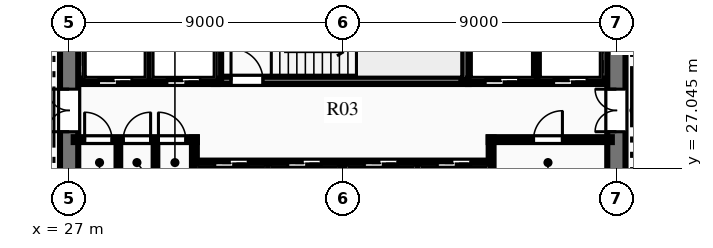
"""IFC4 building model, lengths in metres.
Left out: names, types, materials, properties, quantities, classifications, styles, units other than length and angle.
Written with IfcOpenShell. Run it as: python <this file> out.ifc"""

import sys

from ifc_helpers import new_model, si_unit, direction, frame, frame_2d, origin, place, context, subcontext, project, spatial, rectangle, extrude, element, fill, save


model = new_model("IFC4")
c1 = context("Model", 3, precision=1e-05, world=origin(), true_north=direction((0.0, 1.0)))
c2 = subcontext(c1, "Body", "Model", "MODEL_VIEW")
j1 = project(units=[si_unit("LENGTHUNIT", "METRE"), si_unit("PLANEANGLEUNIT", "RADIAN")], contexts=[c1])
p1 = place(None, origin())
s1 = spatial("IfcSite", under=j1, at=p1, CompositionType="ELEMENT")
p2 = place(p1, origin())
s2 = spatial("IfcBuilding", under=s1, at=p2, CompositionType="ELEMENT")
p3 = place(p2, frame((0.0, 0.0, 47.7)))
s3 = spatial("IfcBuildingStorey", under=s2, at=p3, CompositionType="ELEMENT", Elevation=47.7)
p4 = place(p3, frame((27.0, 18.3, 0.0), z_axis=(0.0, 0.0, 1.0), x_axis=(0.0, 1.0, 0.0)))
e1 = element("IfcWall", 1, at=p4, inside=s3, PredefinedType="SHEAR", context=c2, shape_type="SweptSolid", body=[
    extrude(rectangle(XDim=15.4, YDim=0.6, at=frame_2d((7.7, 0.0))), origin(), (0.0, 0.0, 1.0), 3.75),
])
p5 = place(p4, frame((9.94, 0.0, 0.0)))
e2 = element("IfcOpeningElement", 2, at=p5, cuts=e1, PredefinedType="OPENING", context=c2, shape_type="SweptSolid", body=[
    extrude(rectangle(XDim=1.4, YDim=2.2, at=frame_2d((0.7, 1.1))), frame((0.0, 0.31, 0.0), z_axis=(0.0, -1.0, 0.0), x_axis=(1.0, 0.0, 0.0)), (0.0, 0.0, 1.0), 0.62),
])
p6 = place(p3, frame((45.0, 18.3, 0.0), z_axis=(0.0, 0.0, 1.0), x_axis=(0.0, 1.0, 0.0)))
e3 = element("IfcWall", 3, at=p6, inside=s3, PredefinedType="SHEAR", context=c2, shape_type="SweptSolid", body=[
    extrude(rectangle(XDim=15.4, YDim=0.6, at=frame_2d((7.7, 0.0))), origin(), (0.0, 0.0, 1.0), 3.75),
])
p7 = place(p6, frame((9.94, 0.0, 0.0)))
e4 = element("IfcOpeningElement", 4, at=p7, cuts=e3, PredefinedType="OPENING", context=c2, shape_type="SweptSolid", body=[
    extrude(rectangle(XDim=1.4, YDim=2.2, at=frame_2d((0.7, 1.1))), frame((0.0, 0.31, 0.0), z_axis=(0.0, -1.0, 0.0), x_axis=(1.0, 0.0, 0.0)), (0.0, 0.0, 1.0), 0.62),
])
p8 = place(p3, frame((31.76, 29.93, 0.0), z_axis=(0.0, 0.0, 1.0), x_axis=(1.0, 0.0, 0.0)))
e5 = element("IfcWall", 5, at=p8, inside=s3, PredefinedType="SHEAR", context=c2, shape_type="SweptSolid", body=[
    extrude(rectangle(XDim=8.38, YDim=0.24, at=frame_2d((4.19, 0.0))), origin(), (0.0, 0.0, 1.0), 3.75),
])
p9 = place(p8, frame((0.565, 0.0, 0.0)))
e6 = element("IfcOpeningElement", 6, at=p9, cuts=e5, PredefinedType="OPENING", context=c2, shape_type="SweptSolid", body=[
    extrude(rectangle(XDim=1.05, YDim=2.15, at=frame_2d((0.525, 1.075))), frame((0.0, 0.13, 0.0), z_axis=(0.0, -1.0, 0.0), x_axis=(1.0, 0.0, 0.0)), (0.0, 0.0, 1.0), 0.26),
])
p10 = place(p3, frame((31.88, 29.93, 0.0), z_axis=(0.0, 0.0, 1.0), x_axis=(0.0, 1.0, 0.0)))
e7 = element("IfcWall", 7, at=p10, inside=s3, PredefinedType="SHEAR", context=c2, shape_type="SweptSolid", body=[
    extrude(rectangle(XDim=3.79, YDim=0.24, at=frame_2d((1.895, 0.0))), origin(), (0.0, 0.0, 1.0), 3.75),
])
p11 = place(p3, frame((40.02, 29.93, 0.0), z_axis=(0.0, 0.0, 1.0), x_axis=(0.0, 1.0, 0.0)))
e8 = element("IfcWall", 8, at=p11, inside=s3, PredefinedType="SHEAR", context=c2, shape_type="SweptSolid", body=[
    extrude(rectangle(XDim=3.85, YDim=0.24, at=frame_2d((1.925, 0.0))), origin(), (0.0, 0.0, 1.0), 3.75),
])
p12 = place(p3, frame((27.15, 27.98, 0.0), z_axis=(0.0, 0.0, 1.0), x_axis=(1.0, 0.0, 0.0)))
e9 = element("IfcWall", 9, at=p12, inside=s3, PredefinedType="PARTITIONING", context=c2, shape_type="SweptSolid", body=[
    extrude(rectangle(XDim=4.05, YDim=0.16, at=frame_2d((2.025, 0.0))), origin(), (0.0, 0.0, 1.0), 3.44),
])
p13 = place(p12, frame((0.36, 0.0, 0.0)))
e10 = element("IfcOpeningElement", 10, at=p13, cuts=e9, PredefinedType="OPENING", context=c2, shape_type="SweptSolid", body=[
    extrude(rectangle(XDim=0.9, YDim=2.15, at=frame_2d((0.45, 1.075))), frame((0.0, 0.09, 0.0), z_axis=(0.0, -1.0, 0.0), x_axis=(1.0, 0.0, 0.0)), (0.0, 0.0, 1.0), 0.18),
])
p14 = place(p12, frame((1.63, 0.0, 0.0)))
e11 = element("IfcOpeningElement", 11, at=p14, cuts=e9, PredefinedType="OPENING", context=c2, shape_type="SweptSolid", body=[
    extrude(rectangle(XDim=0.9, YDim=2.15, at=frame_2d((0.45, 1.075))), frame((0.0, 0.09, 0.0), z_axis=(0.0, -1.0, 0.0), x_axis=(1.0, 0.0, 0.0)), (0.0, 0.0, 1.0), 0.18),
])
p15 = place(p12, frame((2.788, 0.0, 0.0)))
e12 = element("IfcOpeningElement", 12, at=p15, cuts=e9, PredefinedType="OPENING", context=c2, shape_type="SweptSolid", body=[
    extrude(rectangle(XDim=0.9, YDim=2.15, at=frame_2d((0.45, 1.075))), frame((0.0, 0.09, 0.0), z_axis=(0.0, -1.0, 0.0), x_axis=(1.0, 0.0, 0.0)), (0.0, 0.0, 1.0), 0.18),
])
p16 = place(p3, frame((31.12, 26.54, 0.0), z_axis=(0.0, 0.0, 1.0), x_axis=(0.0, 1.0, 0.0)))
e13 = element("IfcWall", 13, at=p16, inside=s3, PredefinedType="PARTITIONING", context=c2, shape_type="SweptSolid", body=[
    extrude(rectangle(XDim=1.51, YDim=0.16, at=frame_2d((0.755, 0.0))), origin(), (0.0, 0.0, 1.0), 3.44),
])
p17 = place(p3, frame((40.8, 27.98, 0.0), z_axis=(0.0, 0.0, 1.0), x_axis=(1.0, 0.0, 0.0)))
e14 = element("IfcWall", 14, at=p17, inside=s3, PredefinedType="PARTITIONING", context=c2, shape_type="SweptSolid", body=[
    extrude(rectangle(XDim=4.05, YDim=0.16, at=frame_2d((2.025, 0.0))), origin(), (0.0, 0.0, 1.0), 3.44),
])
p18 = place(p17, frame((1.475, 0.0, 0.0)))
e15 = element("IfcOpeningElement", 15, at=p18, cuts=e14, PredefinedType="OPENING", context=c2, shape_type="SweptSolid", body=[
    extrude(rectangle(XDim=0.95, YDim=2.15, at=frame_2d((0.475, 1.075))), frame((0.0, 0.09, 0.0), z_axis=(0.0, -1.0, 0.0), x_axis=(1.0, 0.0, 0.0)), (0.0, 0.0, 1.0), 0.18),
])
p19 = place(p3, frame((40.88, 26.54, 0.0), z_axis=(0.0, 0.0, 1.0), x_axis=(0.0, 1.0, 0.0)))
e16 = element("IfcWall", 16, at=p19, inside=s3, PredefinedType="PARTITIONING", context=c2, shape_type="SweptSolid", body=[
    extrude(rectangle(XDim=1.51, YDim=0.16, at=frame_2d((0.755, 0.0))), origin(), (0.0, 0.0, 1.0), 3.44),
])
for number, where, z_axis, x_axis in (
    (17, (28.62, 26.54, 0.0), (0.0, 0.0, 1.0), (0.0, 1.0, 0.0)),
    (18, (29.84, 26.54, 0.0), (0.0, 0.0, 1.0), (0.0, 1.0, 0.0)),
):
    element("IfcWall", number, at=place(p3, frame(where, z_axis=z_axis, x_axis=x_axis)), inside=s3, PredefinedType="PARTITIONING", context=c2, shape_type="SweptSolid", body=[
        extrude(rectangle(XDim=1.44, YDim=0.12, at=frame_2d((0.72, 0.0))), origin(), (0.0, 0.0, 1.0), 3.44),
    ])
p20 = place(p3, frame((27.45, 29.9, 0.0), z_axis=(0.0, 0.0, 1.0), x_axis=(1.0, 0.0, 0.0)))
e19 = element("IfcWall", 19, at=p20, inside=s3, PredefinedType="PARTITIONING", context=c2, shape_type="SweptSolid", body=[
    extrude(rectangle(XDim=4.43, YDim=0.18, at=frame_2d((2.215, 0.0))), origin(), (0.0, 0.0, 1.0), 3.44),
])
p21 = place(p20, frame((0.515, 0.0, 0.0)))
e20 = element("IfcOpeningElement", 20, at=p21, cuts=e19, PredefinedType="OPENING", context=c2, shape_type="SweptSolid", body=[
    extrude(rectangle(XDim=1.1, YDim=2.15, at=frame_2d((0.55, 1.075))), frame((0.0, 0.1, 0.0), z_axis=(0.0, -1.0, 0.0), x_axis=(1.0, 0.0, 0.0)), (0.0, 0.0, 1.0), 0.2),
])
p22 = place(p20, frame((2.765, 0.0, 0.0)))
e21 = element("IfcOpeningElement", 21, at=p22, cuts=e19, PredefinedType="OPENING", context=c2, shape_type="SweptSolid", body=[
    extrude(rectangle(XDim=1.1, YDim=2.15, at=frame_2d((0.55, 1.075))), frame((0.0, 0.1, 0.0), z_axis=(0.0, -1.0, 0.0), x_axis=(1.0, 0.0, 0.0)), (0.0, 0.0, 1.0), 0.2),
])
p23 = place(p3, frame((29.63, 29.9, 0.0), z_axis=(0.0, 0.0, 1.0), x_axis=(0.0, 1.0, 0.0)))
e22 = element("IfcWall", 22, at=p23, inside=s3, PredefinedType="PARTITIONING", context=c2, shape_type="SweptSolid", body=[
    extrude(rectangle(XDim=3.75, YDim=0.18, at=frame_2d((1.875, 0.0))), origin(), (0.0, 0.0, 1.0), 3.44),
])
p24 = place(p3, frame((40.12, 29.9, 0.0), z_axis=(0.0, 0.0, 1.0), x_axis=(1.0, 0.0, 0.0)))
e23 = element("IfcWall", 23, at=p24, inside=s3, PredefinedType="PARTITIONING", context=c2, shape_type="SweptSolid", body=[
    extrude(rectangle(XDim=4.43, YDim=0.18, at=frame_2d((2.215, 0.0))), origin(), (0.0, 0.0, 1.0), 3.44),
])
p25 = place(p24, frame((0.565, 0.0, 0.0)))
e24 = element("IfcOpeningElement", 24, at=p25, cuts=e23, PredefinedType="OPENING", context=c2, shape_type="SweptSolid", body=[
    extrude(rectangle(XDim=1.1, YDim=2.15, at=frame_2d((0.55, 1.075))), frame((0.0, 0.1, 0.0), z_axis=(0.0, -1.0, 0.0), x_axis=(1.0, 0.0, 0.0)), (0.0, 0.0, 1.0), 0.2),
])
p26 = place(p24, frame((2.815, 0.0, 0.0)))
e25 = element("IfcOpeningElement", 25, at=p26, cuts=e23, PredefinedType="OPENING", context=c2, shape_type="SweptSolid", body=[
    extrude(rectangle(XDim=1.1, YDim=2.15, at=frame_2d((0.55, 1.075))), frame((0.0, 0.1, 0.0), z_axis=(0.0, -1.0, 0.0), x_axis=(1.0, 0.0, 0.0)), (0.0, 0.0, 1.0), 0.2),
])
p27 = place(p3, frame((42.37, 29.9, 0.0), z_axis=(0.0, 0.0, 1.0), x_axis=(0.0, 1.0, 0.0)))
e26 = element("IfcWall", 26, at=p27, inside=s3, PredefinedType="PARTITIONING", context=c2, shape_type="SweptSolid", body=[
    extrude(rectangle(XDim=3.75, YDim=0.18, at=frame_2d((1.875, 0.0))), origin(), (0.0, 0.0, 1.0), 3.44),
])
p28 = place(p3, frame((31.2, 27.2, 0.0), z_axis=(0.0, 0.0, 1.0), x_axis=(1.0, 0.0, 0.0)))
e27 = element("IfcWall", 27, at=p28, inside=s3, PredefinedType="PARTITIONING", context=c2, shape_type="SweptSolid", body=[
    extrude(rectangle(XDim=9.6, YDim=0.18, at=frame_2d((4.8, 0.0))), origin(), (0.0, 0.0, 1.0), 3.44),
])
p29 = place(p28, frame((0.59, 0.0, 0.0)))
e28 = element("IfcOpeningElement", 28, at=p29, cuts=e27, PredefinedType="OPENING", context=c2, shape_type="SweptSolid", body=[
    extrude(rectangle(XDim=1.1, YDim=2.15, at=frame_2d((0.55, 1.075))), frame((0.0, 0.1, 0.0), z_axis=(0.0, -1.0, 0.0), x_axis=(1.0, 0.0, 0.0)), (0.0, 0.0, 1.0), 0.2),
])
p30 = place(p28, frame((2.99, 0.0, 0.0)))
e29 = element("IfcOpeningElement", 29, at=p30, cuts=e27, PredefinedType="OPENING", context=c2, shape_type="SweptSolid", body=[
    extrude(rectangle(XDim=1.1, YDim=2.15, at=frame_2d((0.55, 1.075))), frame((0.0, 0.1, 0.0), z_axis=(0.0, -1.0, 0.0), x_axis=(1.0, 0.0, 0.0)), (0.0, 0.0, 1.0), 0.2),
])
p31 = place(p28, frame((5.51, 0.0, 0.0)))
e30 = element("IfcOpeningElement", 30, at=p31, cuts=e27, PredefinedType="OPENING", context=c2, shape_type="SweptSolid", body=[
    extrude(rectangle(XDim=1.1, YDim=2.15, at=frame_2d((0.55, 1.075))), frame((0.0, 0.1, 0.0), z_axis=(0.0, -1.0, 0.0), x_axis=(1.0, 0.0, 0.0)), (0.0, 0.0, 1.0), 0.2),
])
p32 = place(p28, frame((7.91, 0.0, 0.0)))
e31 = element("IfcOpeningElement", 31, at=p32, cuts=e27, PredefinedType="OPENING", context=c2, shape_type="SweptSolid", body=[
    extrude(rectangle(XDim=1.1, YDim=2.15, at=frame_2d((0.55, 1.075))), frame((0.0, 0.1, 0.0), z_axis=(0.0, -1.0, 0.0), x_axis=(1.0, 0.0, 0.0)), (0.0, 0.0, 1.0), 0.2),
])
for number, where, z_axis, x_axis in (
    (32, (33.54, 25.3, 0.0), (0.0, 0.0, 1.0), (0.0, 1.0, 0.0)),
    (33, (36.0, 25.3, 0.0), (0.0, 0.0, 1.0), (0.0, 1.0, 0.0)),
    (34, (38.46, 25.3, 0.0), (0.0, 0.0, 1.0), (0.0, 1.0, 0.0)),
):
    element("IfcWall", number, at=place(p3, frame(where, z_axis=z_axis, x_axis=x_axis)), inside=s3, PredefinedType="PARTITIONING", context=c2, shape_type="SweptSolid", body=[
        extrude(rectangle(XDim=1.9, YDim=0.18, at=frame_2d((0.95, 0.0))), origin(), (0.0, 0.0, 1.0), 3.44),
    ])
p33 = place(p13, origin())
e35 = element("IfcDoor", 35, at=p33, inside=s3, OperationType="SINGLE_SWING_LEFT", PredefinedType="DOOR", context=c2, shape_type="SweptSolid", body=[
    extrude(rectangle(XDim=0.9, YDim=2.15, at=frame_2d((0.45, 1.075))), frame((0.0, 0.025, 0.0), z_axis=(0.0, -1.0, 0.0), x_axis=(1.0, 0.0, 0.0)), (0.0, 0.0, 1.0), 0.05),
])
fill(e10, e35)
p34 = place(p14, origin())
e36 = element("IfcDoor", 36, at=p34, inside=s3, OperationType="SINGLE_SWING_RIGHT", PredefinedType="DOOR", context=c2, shape_type="SweptSolid", body=[
    extrude(rectangle(XDim=0.9, YDim=2.15, at=frame_2d((0.45, 1.075))), frame((0.0, 0.025, 0.0), z_axis=(0.0, -1.0, 0.0), x_axis=(1.0, 0.0, 0.0)), (0.0, 0.0, 1.0), 0.05),
])
fill(e11, e36)
p35 = place(p15, origin())
e37 = element("IfcDoor", 37, at=p35, inside=s3, OperationType="SINGLE_SWING_LEFT", PredefinedType="DOOR", context=c2, shape_type="SweptSolid", body=[
    extrude(rectangle(XDim=0.9, YDim=2.15, at=frame_2d((0.45, 1.075))), frame((0.0, 0.025, 0.0), z_axis=(0.0, -1.0, 0.0), x_axis=(1.0, 0.0, 0.0)), (0.0, 0.0, 1.0), 0.05),
])
fill(e12, e37)
p36 = place(p18, origin())
e38 = element("IfcDoor", 38, at=p36, inside=s3, OperationType="SINGLE_SWING_RIGHT", PredefinedType="DOOR", context=c2, shape_type="SweptSolid", body=[
    extrude(rectangle(XDim=0.95, YDim=2.15, at=frame_2d((0.475, 1.075))), frame((0.0, 0.025, 0.0), z_axis=(0.0, -1.0, 0.0), x_axis=(1.0, 0.0, 0.0)), (0.0, 0.0, 1.0), 0.05),
])
fill(e15, e38)
p37 = place(p9, origin())
e39 = element("IfcDoor", 39, at=p37, inside=s3, OperationType="SINGLE_SWING_LEFT", PredefinedType="DOOR", context=c2, shape_type="SweptSolid", body=[
    extrude(rectangle(XDim=1.05, YDim=2.15, at=frame_2d((0.525, 1.075))), frame((0.0, 0.025, 0.0), z_axis=(0.0, -1.0, 0.0), x_axis=(1.0, 0.0, 0.0)), (0.0, 0.0, 1.0), 0.05),
])
fill(e6, e39)
p38 = place(p5, origin())
e40 = element("IfcDoor", 40, at=p38, inside=s3, OperationType="DOUBLE_DOOR_SINGLE_SWING", PredefinedType="DOOR", context=c2, shape_type="SweptSolid", body=[
    extrude(rectangle(XDim=1.4, YDim=2.2, at=frame_2d((0.7, 1.1))), frame((0.0, 0.025, 0.0), z_axis=(0.0, -1.0, 0.0), x_axis=(1.0, 0.0, 0.0)), (0.0, 0.0, 1.0), 0.05),
])
fill(e2, e40)
p39 = place(p7, origin())
e41 = element("IfcDoor", 41, at=p39, inside=s3, OperationType="DOUBLE_DOOR_SINGLE_SWING", PredefinedType="DOOR", context=c2, shape_type="SweptSolid", body=[
    extrude(rectangle(XDim=1.4, YDim=2.2, at=frame_2d((0.7, 1.1))), frame((0.0, 0.025, 0.0), z_axis=(0.0, -1.0, 0.0), x_axis=(1.0, 0.0, 0.0)), (0.0, 0.0, 1.0), 0.05),
])
fill(e4, e41)
p40 = place(p21, origin())
e42 = element("IfcDoor", 42, at=p40, inside=s3, OperationType="SLIDING_TO_LEFT", PredefinedType="DOOR", context=c2, shape_type="SweptSolid", body=[
    extrude(rectangle(XDim=1.1, YDim=2.15, at=frame_2d((0.55, 1.075))), frame((0.0, 0.025, 0.0), z_axis=(0.0, -1.0, 0.0), x_axis=(1.0, 0.0, 0.0)), (0.0, 0.0, 1.0), 0.05),
])
fill(e20, e42)
p41 = place(p22, origin())
e43 = element("IfcDoor", 43, at=p41, inside=s3, OperationType="SLIDING_TO_LEFT", PredefinedType="DOOR", context=c2, shape_type="SweptSolid", body=[
    extrude(rectangle(XDim=1.1, YDim=2.15, at=frame_2d((0.55, 1.075))), frame((0.0, 0.025, 0.0), z_axis=(0.0, -1.0, 0.0), x_axis=(1.0, 0.0, 0.0)), (0.0, 0.0, 1.0), 0.05),
])
fill(e21, e43)
p42 = place(p25, origin())
e44 = element("IfcDoor", 44, at=p42, inside=s3, OperationType="SLIDING_TO_LEFT", PredefinedType="DOOR", context=c2, shape_type="SweptSolid", body=[
    extrude(rectangle(XDim=1.1, YDim=2.15, at=frame_2d((0.55, 1.075))), frame((0.0, 0.025, 0.0), z_axis=(0.0, -1.0, 0.0), x_axis=(1.0, 0.0, 0.0)), (0.0, 0.0, 1.0), 0.05),
])
fill(e24, e44)
p43 = place(p26, origin())
e45 = element("IfcDoor", 45, at=p43, inside=s3, OperationType="SLIDING_TO_LEFT", PredefinedType="DOOR", context=c2, shape_type="SweptSolid", body=[
    extrude(rectangle(XDim=1.1, YDim=2.15, at=frame_2d((0.55, 1.075))), frame((0.0, 0.025, 0.0), z_axis=(0.0, -1.0, 0.0), x_axis=(1.0, 0.0, 0.0)), (0.0, 0.0, 1.0), 0.05),
])
fill(e25, e45)
p44 = place(p29, origin())
e46 = element("IfcDoor", 46, at=p44, inside=s3, OperationType="SLIDING_TO_LEFT", PredefinedType="DOOR", context=c2, shape_type="SweptSolid", body=[
    extrude(rectangle(XDim=1.1, YDim=2.15, at=frame_2d((0.55, 1.075))), frame((0.0, 0.025, 0.0), z_axis=(0.0, -1.0, 0.0), x_axis=(1.0, 0.0, 0.0)), (0.0, 0.0, 1.0), 0.05),
])
fill(e28, e46)
p45 = place(p30, origin())
e47 = element("IfcDoor", 47, at=p45, inside=s3, OperationType="SLIDING_TO_LEFT", PredefinedType="DOOR", context=c2, shape_type="SweptSolid", body=[
    extrude(rectangle(XDim=1.1, YDim=2.15, at=frame_2d((0.55, 1.075))), frame((0.0, 0.025, 0.0), z_axis=(0.0, -1.0, 0.0), x_axis=(1.0, 0.0, 0.0)), (0.0, 0.0, 1.0), 0.05),
])
fill(e29, e47)
p46 = place(p31, origin())
e48 = element("IfcDoor", 48, at=p46, inside=s3, OperationType="SLIDING_TO_LEFT", PredefinedType="DOOR", context=c2, shape_type="SweptSolid", body=[
    extrude(rectangle(XDim=1.1, YDim=2.15, at=frame_2d((0.55, 1.075))), frame((0.0, 0.025, 0.0), z_axis=(0.0, -1.0, 0.0), x_axis=(1.0, 0.0, 0.0)), (0.0, 0.0, 1.0), 0.05),
])
fill(e30, e48)
p47 = place(p32, origin())
e49 = element("IfcDoor", 49, at=p47, inside=s3, OperationType="SLIDING_TO_LEFT", PredefinedType="DOOR", context=c2, shape_type="SweptSolid", body=[
    extrude(rectangle(XDim=1.1, YDim=2.15, at=frame_2d((0.55, 1.075))), frame((0.0, 0.025, 0.0), z_axis=(0.0, -1.0, 0.0), x_axis=(1.0, 0.0, 0.0)), (0.0, 0.0, 1.0), 0.05),
])
fill(e31, e49)
save(model, sys.argv[1])
